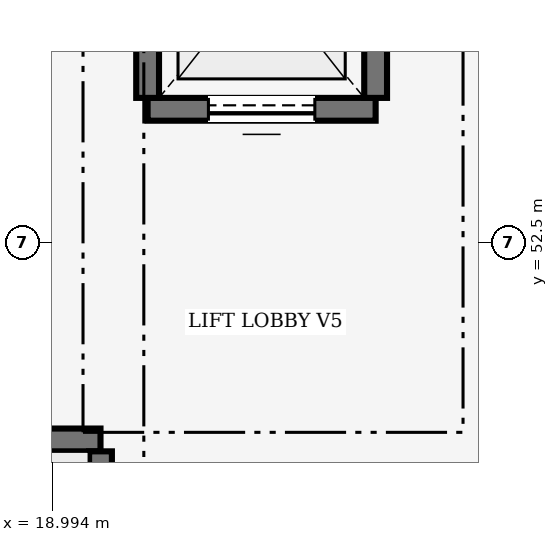
"""IFC4 building model, lengths in metres.
Left out: names, types, materials, properties, quantities, classifications, styles, units other than length and angle.
Written with IfcOpenShell. Run it as: python <this file> out.ifc"""

import sys

from ifc_helpers import new_model, si_unit, direction, frame, frame_2d, origin, place, context, subcontext, project, spatial, rectangle, extrude, element, fill, save


model = new_model("IFC4")
c1 = context("Model", 3, precision=1e-05, world=origin(), true_north=direction((0.0, 1.0)))
c2 = subcontext(c1, "Body", "Model", "MODEL_VIEW")
j1 = project(units=[si_unit("LENGTHUNIT", "METRE"), si_unit("PLANEANGLEUNIT", "RADIAN")], contexts=[c1])
p1 = place(None, origin())
s1 = spatial("IfcSite", under=j1, at=p1, CompositionType="ELEMENT")
p2 = place(p1, origin())
s2 = spatial("IfcBuilding", under=s1, at=p2, CompositionType="ELEMENT")
p3 = place(p2, origin())
s3 = spatial("IfcBuildingStorey", under=s2, at=p3, CompositionType="ELEMENT", Elevation=0.0)
p4 = place(p3, frame((9.45, 49.9, 0.0), z_axis=(0.0, 0.0, 1.0), x_axis=(1.0, 0.0, 0.0)))
e1 = element("IfcWall", 1, at=p4, inside=s3, PredefinedType="SHEAR", context=c2, shape_type="SweptSolid", body=[
    extrude(rectangle(XDim=10.18, YDim=0.3, at=frame_2d((5.09, 0.0))), origin(), (0.0, 0.0, 1.0), 4.25),
])
p5 = place(p3, frame((19.63, 49.75, 0.0), z_axis=(0.0, 0.0, 1.0), x_axis=(0.0, -1.0, 0.0)))
e2 = element("IfcWall", 2, at=p5, inside=s3, PredefinedType="SHEAR", context=c2, shape_type="SweptSolid", body=[
    extrude(rectangle(XDim=4.15, YDim=0.3, at=frame_2d((2.075, 0.0))), origin(), (0.0, 0.0, 1.0), 4.25),
])
p6 = place(p3, frame((23.25, 54.25, 0.0), z_axis=(0.0, 0.0, 1.0), x_axis=(-1.0, 0.0, 0.0)))
e3 = element("IfcWall", 3, at=p6, inside=s3, PredefinedType="SHEAR", context=c2, shape_type="SweptSolid", body=[
    extrude(rectangle(XDim=3.0, YDim=0.3, at=frame_2d((1.5, 0.0))), origin(), (0.0, 0.0, 1.0), 4.25),
])
p7 = place(p6, frame((0.8, 0.0, 0.0)))
e4 = element("IfcOpeningElement", 4, at=p7, cuts=e3, PredefinedType="OPENING", context=c2, shape_type="SweptSolid", body=[
    extrude(rectangle(XDim=1.4, YDim=2.2, at=frame_2d((0.7, 1.1))), frame((0.0, 0.15, 0.0), z_axis=(0.0, -1.0, 0.0), x_axis=(1.0, 0.0, 0.0)), (0.0, 0.0, 1.0), 0.3),
])
for number, where, z_axis, x_axis in (
    (5, (20.25, 54.4, 0.0), (0.0, 0.0, 1.0), (0.0, 1.0, 0.0)),
    (6, (23.25, 57.7, 0.0), (0.0, 0.0, 1.0), (0.0, -1.0, 0.0)),
):
    element("IfcWall", number, at=place(p3, frame(where, z_axis=z_axis, x_axis=x_axis)), inside=s3, PredefinedType="SHEAR", context=c2, shape_type="SweptSolid", body=[
        extrude(rectangle(XDim=3.3, YDim=0.3, at=frame_2d((1.65, 0.0))), origin(), (0.0, 0.0, 1.0), 4.25),
    ])
p8 = place(p7, origin())
e7 = element("IfcDoor", 7, at=p8, inside=s3, OperationType="DOUBLE_DOOR_SLIDING", PredefinedType="DOOR", context=c2, shape_type="SweptSolid", body=[
    extrude(rectangle(XDim=1.4, YDim=2.2, at=frame_2d((0.7, 1.1))), frame((0.0, 0.025, 0.0), z_axis=(0.0, -1.0, 0.0), x_axis=(1.0, 0.0, 0.0)), (0.0, 0.0, 1.0), 0.05),
])
fill(e4, e7)
save(model, sys.argv[1])
